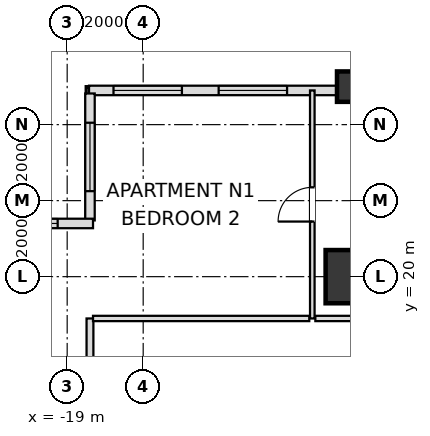
"""IFC4 building model, lengths in metres.
Left out: names, types, materials, properties, quantities, classifications, styles, units other than length and angle.
Written with IfcOpenShell. Run it as: python <this file> out.ifc"""

import sys

from ifc_helpers import new_model, si_unit, direction, frame, frame_2d, origin, origin_2d, place, context, subcontext, project, spatial, rectangle, extrude, element, fill, save


model = new_model("IFC4")
c1 = context("Model", 3, precision=1e-05, world=origin(), true_north=direction((0.0, 1.0)))
c2 = subcontext(c1, "Body", "Model", "MODEL_VIEW")
j1 = project(units=[si_unit("LENGTHUNIT", "METRE"), si_unit("PLANEANGLEUNIT", "RADIAN")], contexts=[c1])
p1 = place(None, origin())
s1 = spatial("IfcSite", under=j1, at=p1, CompositionType="ELEMENT")
p2 = place(p1, origin())
s2 = spatial("IfcBuilding", under=s1, at=p2, CompositionType="ELEMENT")
p3 = place(p2, frame((0.0, 0.0, 27.6)))
s3 = spatial("IfcBuildingStorey", under=s2, at=p3, CompositionType="ELEMENT", Elevation=27.6)
p4 = place(p3, frame((-11.5, 20.0, 0.0), z_axis=(0.0, 0.0, 1.0), x_axis=(1.0, 0.0, 0.0)))
e1 = element("IfcColumn", 1, at=p4, inside=s3, PredefinedType="USERDEFINED", context=c2, shape_type="SweptSolid", body=[
    extrude(rectangle(XDim=1.4, YDim=1.4, at=origin_2d()), origin(), (0.0, 0.0, 1.0), 4.8),
])
p5 = place(p3, frame((-11.5, 25.0, 0.0), z_axis=(0.0, 0.0, 1.0), x_axis=(1.0, 0.0, 0.0)))
e2 = element("IfcColumn", 2, at=p5, inside=s3, PredefinedType="COLUMN", context=c2, shape_type="SweptSolid", body=[
    extrude(rectangle(XDim=0.8, YDim=0.8, at=origin_2d()), origin(), (0.0, 0.0, 1.0), 4.8),
])
p6 = place(p3, frame((-11.895, 24.9, 0.0), z_axis=(0.0, 0.0, 1.0), x_axis=(-1.0, 0.0, 0.0)))
e3 = element("IfcWall", 3, at=p6, inside=s3, PredefinedType="SOLIDWALL", context=c2, shape_type="SweptSolid", body=[
    extrude(rectangle(XDim=6.53, YDim=0.25, at=frame_2d((3.265, 0.0))), origin(), (0.0, 0.0, 1.0), 3.936),
])
p7 = place(p6, frame((1.319, 0.0, 0.72)))
e4 = element("IfcOpeningElement", 4, at=p7, cuts=e3, PredefinedType="OPENING", context=c2, shape_type="SweptSolid", body=[
    extrude(rectangle(XDim=1.8, YDim=1.68, at=frame_2d((0.9, 0.84))), frame((0.0, 0.135, 0.0), z_axis=(0.0, -1.0, 0.0), x_axis=(1.0, 0.0, 0.0)), (0.0, 0.0, 1.0), 0.27),
])
p8 = place(p6, frame((4.086, 0.0, 0.72)))
e5 = element("IfcOpeningElement", 5, at=p8, cuts=e3, PredefinedType="OPENING", context=c2, shape_type="SweptSolid", body=[
    extrude(rectangle(XDim=1.8, YDim=1.68, at=frame_2d((0.9, 0.84))), frame((0.0, 0.135, 0.0), z_axis=(0.0, -1.0, 0.0), x_axis=(1.0, 0.0, 0.0)), (0.0, 0.0, 1.0), 0.27),
])
p9 = place(p3, frame((-18.4, 24.82, 0.0), z_axis=(0.0, 0.0, 1.0), x_axis=(0.0, -1.0, 0.0)))
e6 = element("IfcWall", 6, at=p9, inside=s3, PredefinedType="SOLIDWALL", context=c2, shape_type="SweptSolid", body=[
    extrude(rectangle(XDim=3.34, YDim=0.25, at=frame_2d((1.67, 0.0))), origin(), (0.0, 0.0, 1.0), 3.936),
])
p10 = place(p9, frame((0.77, 0.0, 0.72)))
e7 = element("IfcOpeningElement", 7, at=p10, cuts=e6, PredefinedType="OPENING", context=c2, shape_type="SweptSolid", body=[
    extrude(rectangle(XDim=1.8, YDim=1.68, at=frame_2d((0.9, 0.84))), frame((0.0, 0.135, 0.0), z_axis=(0.0, -1.0, 0.0), x_axis=(1.0, 0.0, 0.0)), (0.0, 0.0, 1.0), 0.27),
])
p11 = place(p3, frame((-18.32, 21.4, 0.0), z_axis=(0.0, 0.0, 1.0), x_axis=(-1.0, 0.0, 0.0)))
e8 = element("IfcWall", 8, at=p11, inside=s3, PredefinedType="SOLIDWALL", context=c2, shape_type="SweptSolid", body=[
    extrude(rectangle(XDim=3.66, YDim=0.25, at=frame_2d((1.83, 0.0))), origin(), (0.0, 0.0, 1.0), 3.936),
])
p12 = place(p11, frame((0.93, 0.0, 0.72)))
e9 = element("IfcOpeningElement", 9, at=p12, cuts=e8, PredefinedType="OPENING", context=c2, shape_type="SweptSolid", body=[
    extrude(rectangle(XDim=1.8, YDim=1.68, at=frame_2d((0.9, 0.84))), frame((0.0, 0.135, 0.0), z_axis=(0.0, -1.0, 0.0), x_axis=(1.0, 0.0, 0.0)), (0.0, 0.0, 1.0), 0.27),
])
p13 = place(p3, frame((-18.4, 9.3, 0.0), z_axis=(0.0, 0.0, 1.0), x_axis=(0.0, 1.0, 0.0)))
e10 = element("IfcWall", 10, at=p13, inside=s3, PredefinedType="PARTITIONING", context=c2, shape_type="SweptSolid", body=[
    extrude(rectangle(XDim=9.6, YDim=0.18, at=frame_2d((4.8, 0.0))), origin(), (0.0, 0.0, 1.0), 3.936),
])
p14 = place(p3, frame((-12.55, 18.9, 0.0), z_axis=(0.0, 0.0, 1.0), x_axis=(0.0, 1.0, 0.0)))
e11 = element("IfcWall", 11, at=p14, inside=s3, PredefinedType="PARTITIONING", context=c2, shape_type="SweptSolid", body=[
    extrude(rectangle(XDim=6.0, YDim=0.12, at=frame_2d((3.0, 0.0))), origin(), (0.0, 0.0, 1.0), 3.936),
])
p15 = place(p14, frame((2.55, 0.0, 0.0)))
e12 = element("IfcOpeningElement", 12, at=p15, cuts=e11, PredefinedType="OPENING", context=c2, shape_type="SweptSolid", body=[
    extrude(rectangle(XDim=0.9, YDim=2.1, at=frame_2d((0.45, 1.05))), frame((0.0, 0.07, 0.0), z_axis=(0.0, -1.0, 0.0), x_axis=(1.0, 0.0, 0.0)), (0.0, 0.0, 1.0), 0.14),
])
p16 = place(p3, frame((-18.32, 18.9, 0.0), z_axis=(0.0, 0.0, 1.0), x_axis=(1.0, 0.0, 0.0)))
e13 = element("IfcWall", 13, at=p16, inside=s3, PredefinedType="PARTITIONING", context=c2, shape_type="SweptSolid", body=[
    extrude(rectangle(XDim=5.69, YDim=0.14, at=frame_2d((2.845, 0.0))), origin(), (0.0, 0.0, 1.0), 3.936),
])
p17 = place(p3, frame((-12.47, 18.9, 0.0), z_axis=(0.0, 0.0, 1.0), x_axis=(1.0, 0.0, 0.0)))
e14 = element("IfcWall", 14, at=p17, inside=s3, PredefinedType="PARTITIONING", context=c2, shape_type="SweptSolid", body=[
    extrude(rectangle(XDim=4.49, YDim=0.14, at=frame_2d((2.245, 0.0))), origin(), (0.0, 0.0, 1.0), 3.936),
])
p18 = place(p7, origin())
e15 = element("IfcWindow", 15, at=p18, inside=s3, PartitioningType="SINGLE_PANEL", PredefinedType="WINDOW", context=c2, shape_type="SweptSolid", body=[
    extrude(rectangle(XDim=1.8, YDim=1.68, at=frame_2d((0.9, 0.84))), frame((0.0, 0.03, 0.0), z_axis=(0.0, -1.0, 0.0), x_axis=(1.0, 0.0, 0.0)), (0.0, 0.0, 1.0), 0.06),
])
fill(e4, e15)
p19 = place(p8, origin())
e16 = element("IfcWindow", 16, at=p19, inside=s3, PartitioningType="SINGLE_PANEL", PredefinedType="WINDOW", context=c2, shape_type="SweptSolid", body=[
    extrude(rectangle(XDim=1.8, YDim=1.68, at=frame_2d((0.9, 0.84))), frame((0.0, 0.03, 0.0), z_axis=(0.0, -1.0, 0.0), x_axis=(1.0, 0.0, 0.0)), (0.0, 0.0, 1.0), 0.06),
])
fill(e5, e16)
p20 = place(p10, origin())
e17 = element("IfcWindow", 17, at=p20, inside=s3, PartitioningType="SINGLE_PANEL", PredefinedType="WINDOW", context=c2, shape_type="SweptSolid", body=[
    extrude(rectangle(XDim=1.8, YDim=1.68, at=frame_2d((0.9, 0.84))), frame((0.0, 0.03, 0.0), z_axis=(0.0, -1.0, 0.0), x_axis=(1.0, 0.0, 0.0)), (0.0, 0.0, 1.0), 0.06),
])
fill(e7, e17)
p21 = place(p12, origin())
e18 = element("IfcWindow", 18, at=p21, inside=s3, PartitioningType="SINGLE_PANEL", PredefinedType="WINDOW", context=c2, shape_type="SweptSolid", body=[
    extrude(rectangle(XDim=1.8, YDim=1.68, at=frame_2d((0.9, 0.84))), frame((0.0, 0.03, 0.0), z_axis=(0.0, -1.0, 0.0), x_axis=(1.0, 0.0, 0.0)), (0.0, 0.0, 1.0), 0.06),
])
fill(e9, e18)
p22 = place(p15, origin())
e19 = element("IfcDoor", 19, at=p22, inside=s3, OperationType="SINGLE_SWING_LEFT", PredefinedType="DOOR", context=c2, shape_type="SweptSolid", body=[
    extrude(rectangle(XDim=0.9, YDim=2.1, at=frame_2d((0.45, 1.05))), frame((0.0, 0.025, 0.0), z_axis=(0.0, -1.0, 0.0), x_axis=(1.0, 0.0, 0.0)), (0.0, 0.0, 1.0), 0.05),
])
fill(e12, e19)
save(model, sys.argv[1])
